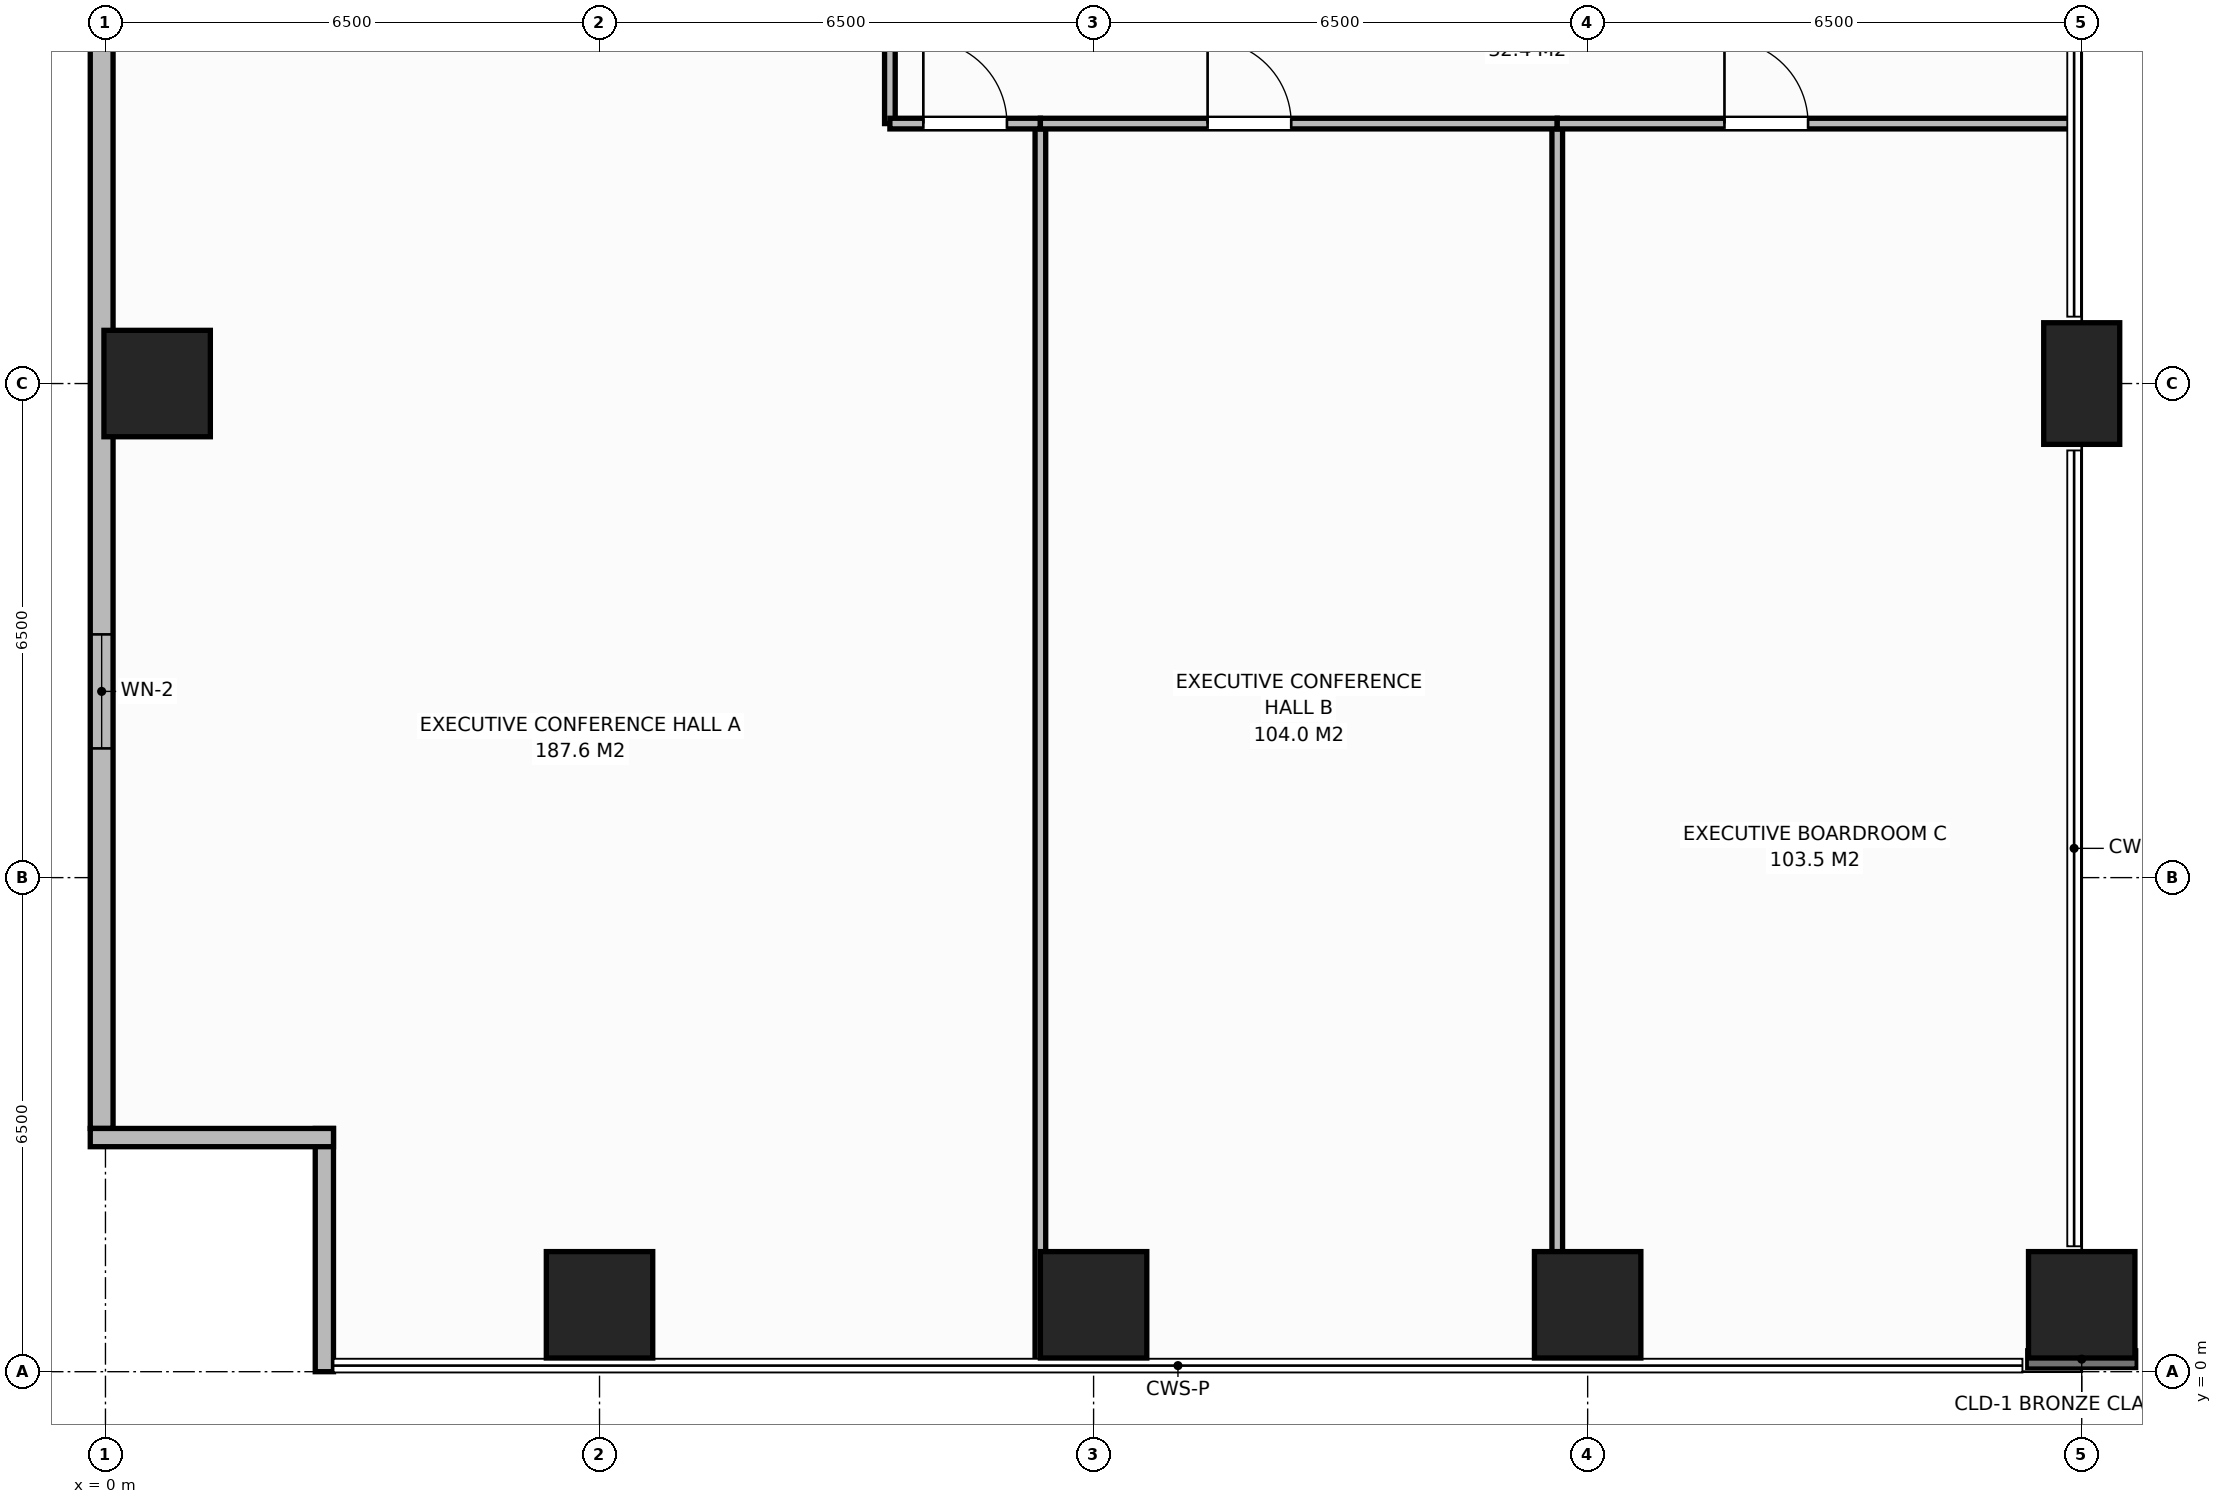
"""IFC4 building model, lengths in metres.
Left out: names, types, materials, properties, quantities, classifications, styles, units other than length and angle.
Written with IfcOpenShell. Run it as: python <this file> out.ifc"""

import sys

from ifc_helpers import new_model, si_unit, direction, frame, frame_2d, origin, origin_2d, place, context, subcontext, project, spatial, rectangle, extrude, element, fill, save


model = new_model("IFC4")
c1 = context("Model", 3, precision=1e-05, world=origin(), true_north=direction((0.0, 1.0)))
c2 = subcontext(c1, "Body", "Model", "MODEL_VIEW")
j1 = project(units=[si_unit("LENGTHUNIT", "METRE"), si_unit("PLANEANGLEUNIT", "RADIAN")], contexts=[c1])
p1 = place(None, origin())
s1 = spatial("IfcSite", under=j1, at=p1, CompositionType="ELEMENT")
p2 = place(p1, origin())
s2 = spatial("IfcBuilding", under=s1, at=p2, CompositionType="ELEMENT")
p3 = place(p2, frame((0.0, 0.0, 6.0)))
s3 = spatial("IfcBuildingStorey", under=s2, at=p3, CompositionType="ELEMENT", Elevation=6.0)
p4 = place(p3, frame((26.0, 13.0, 0.0), z_axis=(0.0, 0.0, 1.0), x_axis=(1.0, 0.0, 0.0)))
e1 = element("IfcColumn", 1, at=p4, inside=s3, PredefinedType="PILASTER", context=c2, shape_type="SweptSolid", body=[
    extrude(rectangle(XDim=1.0, YDim=1.6, at=origin_2d()), origin(), (0.0, 0.0, 1.0), 5.5),
])
for number, where, z_axis, x_axis in (
    (2, (6.5, 0.88, 0.0), (0.0, 0.0, 1.0), (1.0, 0.0, 0.0)),
    (3, (13.0, 0.88, 0.0), (0.0, 0.0, 1.0), (1.0, 0.0, 0.0)),
    (4, (19.5, 0.88, 0.0), (0.0, 0.0, 1.0), (1.0, 0.0, 0.0)),
    (5, (26.0, 0.88, 0.0), (0.0, 0.0, 1.0), (1.0, 0.0, 0.0)),
    (6, (0.68, 13.0, 0.0), (0.0, 0.0, 1.0), (1.0, 0.0, 0.0)),
):
    element("IfcColumn", number, at=place(p3, frame(where, z_axis=z_axis, x_axis=x_axis)), inside=s3, PredefinedType="COLUMN", context=c2, shape_type="SweptSolid", body=[
        extrude(rectangle(XDim=1.4, YDim=1.4, at=origin_2d()), origin(), (0.0, 0.0, 1.0), 5.5),
    ])
p5 = place(p3, frame((-0.05, 3.2, 0.0), z_axis=(0.0, 0.0, 1.0), x_axis=(0.0, 1.0, 0.0)))
e7 = element("IfcWall", 7, at=p5, inside=s3, PredefinedType="STANDARD", context=c2, shape_type="SweptSolid", body=[
    extrude(rectangle(XDim=45.6, YDim=0.3, at=frame_2d((22.8, 0.0))), origin(), (0.0, 0.0, 1.0), 5.22),
])
p6 = place(p5, frame((5.0, 0.0, 0.9)))
e8 = element("IfcOpeningElement", 8, at=p6, cuts=e7, PredefinedType="OPENING", context=c2, shape_type="SweptSolid", body=[
    extrude(rectangle(XDim=1.5, YDim=2.2, at=frame_2d((0.75, 1.1))), frame((0.0, 0.16, 0.0), z_axis=(0.0, -1.0, 0.0), x_axis=(1.0, 0.0, 0.0)), (0.0, 0.0, 1.0), 0.32),
])
p7 = place(p5, frame((14.5, 0.0, 0.9)))
e9 = element("IfcOpeningElement", 9, at=p7, cuts=e7, PredefinedType="OPENING", context=c2, shape_type="SweptSolid", body=[
    extrude(rectangle(XDim=1.5, YDim=2.2, at=frame_2d((0.75, 1.1))), frame((0.0, 0.16, 0.0), z_axis=(0.0, -1.0, 0.0), x_axis=(1.0, 0.0, 0.0)), (0.0, 0.0, 1.0), 0.32),
])
p8 = place(p5, frame((25.5, 0.0, 0.9)))
e10 = element("IfcOpeningElement", 10, at=p8, cuts=e7, PredefinedType="OPENING", context=c2, shape_type="SweptSolid", body=[
    extrude(rectangle(XDim=1.5, YDim=2.2, at=frame_2d((0.75, 1.1))), frame((0.0, 0.16, 0.0), z_axis=(0.0, -1.0, 0.0), x_axis=(1.0, 0.0, 0.0)), (0.0, 0.0, 1.0), 0.32),
])
p9 = place(p5, frame((35.0, 0.0, 0.9)))
e11 = element("IfcOpeningElement", 11, at=p9, cuts=e7, PredefinedType="OPENING", context=c2, shape_type="SweptSolid", body=[
    extrude(rectangle(XDim=1.5, YDim=2.2, at=frame_2d((0.75, 1.1))), frame((0.0, 0.16, 0.0), z_axis=(0.0, -1.0, 0.0), x_axis=(1.0, 0.0, 0.0)), (0.0, 0.0, 1.0), 0.32),
])
for number, where, z_axis, x_axis in (
    (12, (2.88, 0.0, 0.0), (0.0, 0.0, 1.0), (0.0, 1.0, 0.0)),
    (13, (3.0, 3.08, 0.0), (0.0, 0.0, 1.0), (-1.0, 0.0, 0.0)),
):
    element("IfcWall", number, at=place(p3, frame(where, z_axis=z_axis, x_axis=x_axis)), inside=s3, PredefinedType="STANDARD", context=c2, shape_type="SweptSolid", body=[
        extrude(rectangle(XDim=3.2, YDim=0.24, at=frame_2d((1.6, 0.0))), origin(), (0.0, 0.0, 1.0), 5.22),
    ])
p10 = place(p3, frame((10.32, 16.42, 0.0), z_axis=(0.0, 0.0, 1.0), x_axis=(0.0, 1.0, 0.0)))
e14 = element("IfcWall", 14, at=p10, inside=s3, PredefinedType="PARTITIONING", context=c2, shape_type="SweptSolid", body=[
    extrude(rectangle(XDim=2.18, YDim=0.14, at=frame_2d((1.09, 0.0))), origin(), (0.0, 0.0, 1.0), 5.22),
])
for number, where, z_axis, x_axis in (
    (15, (12.3, 0.06, 0.0), (0.0, 0.0, 1.0), (0.0, 1.0, 0.0)),
    (16, (19.1, 0.06, 0.0), (0.0, 0.0, 1.0), (0.0, 1.0, 0.0)),
):
    element("IfcWall", number, at=place(p3, frame(where, z_axis=z_axis, x_axis=x_axis)), inside=s3, PredefinedType="PARTITIONING", context=c2, shape_type="SweptSolid", body=[
        extrude(rectangle(XDim=16.36, YDim=0.14, at=frame_2d((8.18, 0.0))), origin(), (0.0, 0.0, 1.0), 5.22),
    ])
p11 = place(p3, frame((10.32, 16.42, 0.0), z_axis=(0.0, 0.0, 1.0), x_axis=(1.0, 0.0, 0.0)))
e17 = element("IfcWall", 17, at=p11, inside=s3, PredefinedType="PARTITIONING", context=c2, shape_type="SweptSolid", body=[
    extrude(rectangle(XDim=1.98, YDim=0.14, at=frame_2d((0.99, 0.0))), origin(), (0.0, 0.0, 1.0), 5.22),
])
p12 = place(p11, frame((0.44, 0.0, 0.0)))
e18 = element("IfcOpeningElement", 18, at=p12, cuts=e17, PredefinedType="OPENING", context=c2, shape_type="SweptSolid", body=[
    extrude(rectangle(XDim=1.1, YDim=2.15, at=frame_2d((0.55, 1.075))), frame((0.0, 0.08, 0.0), z_axis=(0.0, -1.0, 0.0), x_axis=(1.0, 0.0, 0.0)), (0.0, 0.0, 1.0), 0.16),
])
p13 = place(p3, frame((12.3, 16.42, 0.0), z_axis=(0.0, 0.0, 1.0), x_axis=(1.0, 0.0, 0.0)))
e19 = element("IfcWall", 19, at=p13, inside=s3, PredefinedType="PARTITIONING", context=c2, shape_type="SweptSolid", body=[
    extrude(rectangle(XDim=6.8, YDim=0.14, at=frame_2d((3.4, 0.0))), origin(), (0.0, 0.0, 1.0), 5.22),
])
p14 = place(p13, frame((2.2, 0.0, 0.0)))
e20 = element("IfcOpeningElement", 20, at=p14, cuts=e19, PredefinedType="OPENING", context=c2, shape_type="SweptSolid", body=[
    extrude(rectangle(XDim=1.1, YDim=2.15, at=frame_2d((0.55, 1.075))), frame((0.0, 0.08, 0.0), z_axis=(0.0, -1.0, 0.0), x_axis=(1.0, 0.0, 0.0)), (0.0, 0.0, 1.0), 0.16),
])
p15 = place(p3, frame((19.1, 16.42, 0.0), z_axis=(0.0, 0.0, 1.0), x_axis=(1.0, 0.0, 0.0)))
e21 = element("IfcWall", 21, at=p15, inside=s3, PredefinedType="PARTITIONING", context=c2, shape_type="SweptSolid", body=[
    extrude(rectangle(XDim=6.82, YDim=0.14, at=frame_2d((3.41, 0.0))), origin(), (0.0, 0.0, 1.0), 5.22),
])
p16 = place(p15, frame((2.2, 0.0, 0.0)))
e22 = element("IfcOpeningElement", 22, at=p16, cuts=e21, PredefinedType="OPENING", context=c2, shape_type="SweptSolid", body=[
    extrude(rectangle(XDim=1.1, YDim=2.15, at=frame_2d((0.55, 1.075))), frame((0.0, 0.08, 0.0), z_axis=(0.0, -1.0, 0.0), x_axis=(1.0, 0.0, 0.0)), (0.0, 0.0, 1.0), 0.16),
])
p17 = place(p6, origin())
e23 = element("IfcWindow", 23, at=p17, inside=s3, PartitioningType="SINGLE_PANEL", PredefinedType="WINDOW", context=c2, shape_type="SweptSolid", body=[
    extrude(rectangle(XDim=1.5, YDim=2.2, at=frame_2d((0.75, 1.1))), frame((0.0, 0.03, 0.0), z_axis=(0.0, -1.0, 0.0), x_axis=(1.0, 0.0, 0.0)), (0.0, 0.0, 1.0), 0.06),
])
fill(e8, e23)
p18 = place(p12, origin())
e24 = element("IfcDoor", 24, at=p18, inside=s3, OperationType="SINGLE_SWING_LEFT", PredefinedType="DOOR", context=c2, shape_type="SweptSolid", body=[
    extrude(rectangle(XDim=1.1, YDim=2.15, at=frame_2d((0.55, 1.075))), frame((0.0, 0.025, 0.0), z_axis=(0.0, -1.0, 0.0), x_axis=(1.0, 0.0, 0.0)), (0.0, 0.0, 1.0), 0.05),
])
fill(e18, e24)
p19 = place(p14, origin())
e25 = element("IfcDoor", 25, at=p19, inside=s3, OperationType="SINGLE_SWING_LEFT", PredefinedType="DOOR", context=c2, shape_type="SweptSolid", body=[
    extrude(rectangle(XDim=1.1, YDim=2.15, at=frame_2d((0.55, 1.075))), frame((0.0, 0.025, 0.0), z_axis=(0.0, -1.0, 0.0), x_axis=(1.0, 0.0, 0.0)), (0.0, 0.0, 1.0), 0.05),
])
fill(e20, e25)
p20 = place(p16, origin())
e26 = element("IfcDoor", 26, at=p20, inside=s3, OperationType="SINGLE_SWING_LEFT", PredefinedType="DOOR", context=c2, shape_type="SweptSolid", body=[
    extrude(rectangle(XDim=1.1, YDim=2.15, at=frame_2d((0.55, 1.075))), frame((0.0, 0.025, 0.0), z_axis=(0.0, -1.0, 0.0), x_axis=(1.0, 0.0, 0.0)), (0.0, 0.0, 1.0), 0.05),
])
fill(e22, e26)
save(model, sys.argv[1])
